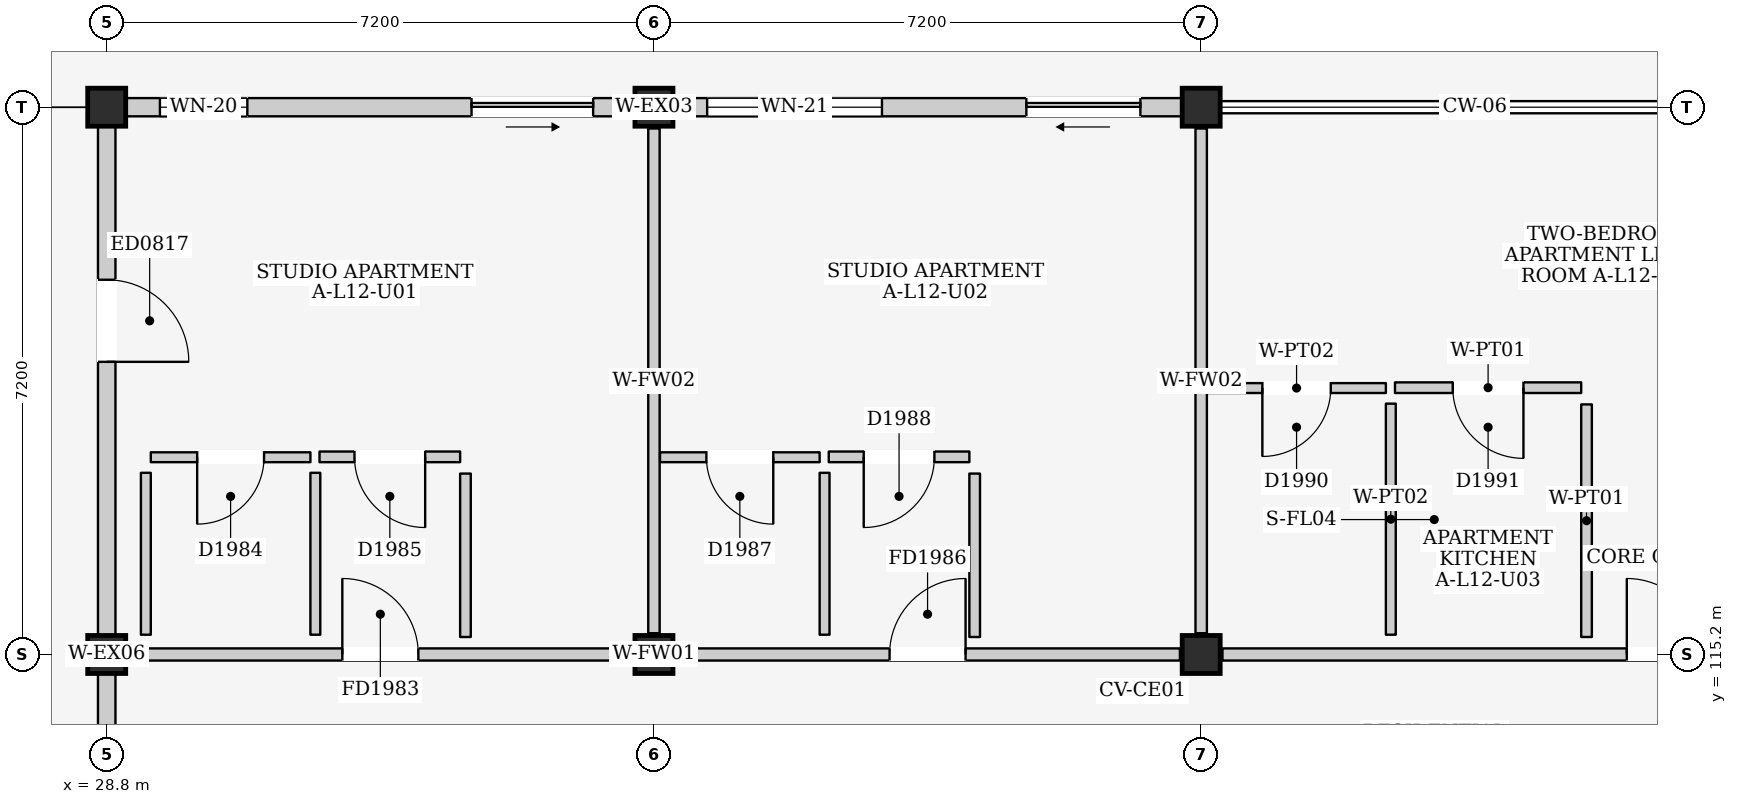
"""IFC4 building model, lengths in metres.
Left out: names, types, materials, properties, quantities, classifications, styles, units other than length and angle.
Written with IfcOpenShell. Run it as: python <this file> out.ifc"""

import sys

from ifc_helpers import new_model, si_unit, direction, frame, frame_2d, origin, origin_2d, place, context, subcontext, project, spatial, rectangle, extrude, element, fill, save


model = new_model("IFC4")
c1 = context("Model", 3, precision=1e-05, world=origin(), true_north=direction((0.0, 1.0)))
c2 = subcontext(c1, "Body", "Model", "MODEL_VIEW")
j1 = project(units=[si_unit("LENGTHUNIT", "METRE"), si_unit("PLANEANGLEUNIT", "RADIAN")], contexts=[c1])
p1 = place(None, origin())
s1 = spatial("IfcSite", under=j1, at=p1, CompositionType="ELEMENT")
p2 = place(p1, origin())
s2 = spatial("IfcBuilding", under=s1, at=p2, CompositionType="ELEMENT")
p3 = place(p2, frame((0.0, 0.0, 41.2)))
s3 = spatial("IfcBuildingStorey", under=s2, at=p3, CompositionType="ELEMENT", Elevation=41.2)
for number, where, z_axis, x_axis in (
    (1, (28.8, 115.2, 0.0), (0.0, 0.0, 1.0), (1.0, 0.0, 0.0)),
    (2, (28.8, 122.4, 0.0), (0.0, 0.0, 1.0), (1.0, 0.0, 0.0)),
    (3, (36.0, 115.2, 0.0), (0.0, 0.0, 1.0), (1.0, 0.0, 0.0)),
    (4, (36.0, 122.4, 0.0), (0.0, 0.0, 1.0), (1.0, 0.0, 0.0)),
    (5, (43.2, 115.2, 0.0), (0.0, 0.0, 1.0), (1.0, 0.0, 0.0)),
    (6, (43.2, 122.4, 0.0), (0.0, 0.0, 1.0), (1.0, 0.0, 0.0)),
):
    element("IfcColumn", number, at=place(p3, frame(where, z_axis=z_axis, x_axis=x_axis)), inside=s3, PredefinedType="COLUMN", context=c2, shape_type="SweptSolid", body=[
        extrude(rectangle(XDim=0.5, YDim=0.5, at=origin_2d()), origin(), (0.0, 0.0, 1.0), 3.2),
    ])
p4 = place(p3, frame((29.05, 122.4, 0.0), z_axis=(0.0, 0.0, 1.0), x_axis=(1.0, 0.0, 0.0)))
e7 = element("IfcWall", 7, at=p4, inside=s3, PredefinedType="ELEMENTEDWALL", context=c2, shape_type="SweptSolid", body=[
    extrude(rectangle(XDim=6.7, YDim=0.24, at=frame_2d((3.35, 0.0))), origin(), (0.0, 0.0, 1.0), 2.485),
])
p5 = place(p4, frame((4.55, 0.0, 0.0)))
e8 = element("IfcOpeningElement", 8, at=p5, cuts=e7, PredefinedType="OPENING", context=c2, shape_type="SweptSolid", body=[
    extrude(rectangle(XDim=1.6, YDim=2.12, at=frame_2d((0.8, 1.06))), frame((0.0, 0.135, 0.0), z_axis=(0.0, -1.0, 0.0), x_axis=(1.0, 0.0, 0.0)), (0.0, 0.0, 1.0), 0.27),
])
p6 = place(p4, frame((0.45, 0.0, 0.9)))
e9 = element("IfcOpeningElement", 9, at=p6, cuts=e7, PredefinedType="OPENING", context=c2, shape_type="SweptSolid", body=[
    extrude(rectangle(XDim=1.15, YDim=1.15, at=frame_2d((0.575, 0.575))), frame((0.0, 0.135, 0.0), z_axis=(0.0, -1.0, 0.0), x_axis=(1.0, 0.0, 0.0)), (0.0, 0.0, 1.0), 0.27),
])
p7 = place(p3, frame((36.25, 122.4, 0.0), z_axis=(0.0, 0.0, 1.0), x_axis=(1.0, 0.0, 0.0)))
e10 = element("IfcWall", 10, at=p7, inside=s3, PredefinedType="ELEMENTEDWALL", context=c2, shape_type="SweptSolid", body=[
    extrude(rectangle(XDim=6.7, YDim=0.24, at=frame_2d((3.35, 0.0))), origin(), (0.0, 0.0, 1.0), 2.485),
])
p8 = place(p7, frame((4.65, 0.0, 0.0)))
e11 = element("IfcOpeningElement", 11, at=p8, cuts=e10, PredefinedType="OPENING", context=c2, shape_type="SweptSolid", body=[
    extrude(rectangle(XDim=1.5, YDim=2.12, at=frame_2d((0.75, 1.06))), frame((0.0, 0.135, 0.0), z_axis=(0.0, -1.0, 0.0), x_axis=(1.0, 0.0, 0.0)), (0.0, 0.0, 1.0), 0.27),
])
p9 = place(p7, frame((0.45, 0.0, 0.775)))
e12 = element("IfcOpeningElement", 12, at=p9, cuts=e10, PredefinedType="OPENING", context=c2, shape_type="SweptSolid", body=[
    extrude(rectangle(XDim=2.3, YDim=1.6, at=frame_2d((1.15, 0.8))), frame((0.0, 0.135, 0.0), z_axis=(0.0, -1.0, 0.0), x_axis=(1.0, 0.0, 0.0)), (0.0, 0.0, 1.0), 0.27),
])
p10 = place(p3, frame((28.8, 108.25, 0.0), z_axis=(0.0, 0.0, 1.0), x_axis=(0.0, 1.0, 0.0)))
e13 = element("IfcWall", 13, at=p10, inside=s3, PredefinedType="ELEMENTEDWALL", context=c2, shape_type="SweptSolid", body=[
    extrude(rectangle(XDim=6.7, YDim=0.23, at=frame_2d((3.35, 0.0))), origin(), (0.0, 0.0, 1.0), 2.435),
])
p11 = place(p10, frame((2.75, 0.0, 1.1)))
e14 = element("IfcOpeningElement", 14, at=p11, cuts=e13, PredefinedType="OPENING", context=c2, shape_type="SweptSolid", body=[
    extrude(rectangle(XDim=1.0, YDim=0.9, at=frame_2d((0.5, 0.45))), frame((0.0, 0.13, 0.0), z_axis=(0.0, -1.0, 0.0), x_axis=(1.0, 0.0, 0.0)), (0.0, 0.0, 1.0), 0.26),
])
p12 = place(p3, frame((28.8, 115.45, 0.0), z_axis=(0.0, 0.0, 1.0), x_axis=(0.0, 1.0, 0.0)))
e15 = element("IfcWall", 15, at=p12, inside=s3, PredefinedType="ELEMENTEDWALL", context=c2, shape_type="SweptSolid", body=[
    extrude(rectangle(XDim=6.7, YDim=0.23, at=frame_2d((3.35, 0.0))), origin(), (0.0, 0.0, 1.0), 2.435),
])
p13 = place(p12, frame((3.6, 0.0, 0.0)))
e16 = element("IfcOpeningElement", 16, at=p13, cuts=e15, PredefinedType="OPENING", context=c2, shape_type="SweptSolid", body=[
    extrude(rectangle(XDim=1.08, YDim=2.12, at=frame_2d((0.54, 1.06))), frame((0.0, 0.13, 0.0), z_axis=(0.0, -1.0, 0.0), x_axis=(1.0, 0.0, 0.0)), (0.0, 0.0, 1.0), 0.26),
])
p14 = place(p3, frame((29.08, 115.2, 0.0), z_axis=(0.0, 0.0, 1.0), x_axis=(1.0, 0.0, 0.0)))
e17 = element("IfcWall", 17, at=p14, inside=s3, PredefinedType="PARTITIONING", context=c2, shape_type="SweptSolid", body=[
    extrude(rectangle(XDim=6.64, YDim=0.16, at=frame_2d((3.32, 0.0))), origin(), (0.0, 0.0, 1.0), 2.285),
])
p15 = place(p14, frame((2.82, 0.0, 0.0)))
e18 = element("IfcOpeningElement", 18, at=p15, cuts=e17, PredefinedType="OPENING", context=c2, shape_type="SweptSolid", body=[
    extrude(rectangle(XDim=1.0, YDim=2.15, at=frame_2d((0.5, 1.075))), frame((0.0, 0.095, 0.0), z_axis=(0.0, -1.0, 0.0), x_axis=(1.0, 0.0, 0.0)), (0.0, 0.0, 1.0), 0.19),
])
p16 = place(p3, frame((36.0, 115.48, 0.0), z_axis=(0.0, 0.0, 1.0), x_axis=(0.0, 1.0, 0.0)))
e19 = element("IfcWall", 19, at=p16, inside=s3, PredefinedType="PARTITIONING", context=c2, shape_type="SweptSolid", body=[
    extrude(rectangle(XDim=6.64, YDim=0.15, at=frame_2d((3.32, 0.0))), origin(), (0.0, 0.0, 1.0), 2.435),
])
p17 = place(p3, frame((29.38, 117.795, 0.0), z_axis=(0.0, 0.0, 1.0), x_axis=(1.0, 0.0, 0.0)))
e20 = element("IfcWall", 20, at=p17, inside=s3, PredefinedType="PARTITIONING", context=c2, shape_type="SweptSolid", body=[
    extrude(rectangle(XDim=2.1, YDim=0.13, at=frame_2d((1.05, 0.0))), origin(), (0.0, 0.0, 1.0), 2.95),
])
p18 = place(p17, frame((0.61, 0.0, 0.0)))
e21 = element("IfcOpeningElement", 21, at=p18, cuts=e20, PredefinedType="OPENING", context=c2, shape_type="SweptSolid", body=[
    extrude(rectangle(XDim=0.88, YDim=2.1, at=frame_2d((0.44, 1.05))), frame((0.0, 0.08, 0.0), z_axis=(0.0, -1.0, 0.0), x_axis=(1.0, 0.0, 0.0)), (0.0, 0.0, 1.0), 0.16),
])
for number, where, z_axis, x_axis in (
    (22, (31.545, 115.46, 0.0), (0.0, 0.0, 1.0), (0.0, 1.0, 0.0)),
    (23, (29.315, 115.46, 0.0), (0.0, 0.0, 1.0), (0.0, 1.0, 0.0)),
):
    element("IfcWall", number, at=place(p3, frame(where, z_axis=z_axis, x_axis=x_axis)), inside=s3, PredefinedType="PARTITIONING", context=c2, shape_type="SweptSolid", body=[
        extrude(rectangle(XDim=2.13, YDim=0.13, at=frame_2d((1.065, 0.0))), origin(), (0.0, 0.0, 1.0), 2.95),
    ])
p19 = place(p3, frame((31.6, 117.8, 0.0), z_axis=(0.0, 0.0, 1.0), x_axis=(1.0, 0.0, 0.0)))
e24 = element("IfcWall", 24, at=p19, inside=s3, PredefinedType="PARTITIONING", context=c2, shape_type="SweptSolid", body=[
    extrude(rectangle(XDim=1.85, YDim=0.14, at=frame_2d((0.925, 0.0))), origin(), (0.0, 0.0, 1.0), 2.95),
])
p20 = place(p19, frame((0.46, 0.0, 0.0)))
e25 = element("IfcOpeningElement", 25, at=p20, cuts=e24, PredefinedType="OPENING", context=c2, shape_type="SweptSolid", body=[
    extrude(rectangle(XDim=0.93, YDim=2.14, at=frame_2d((0.465, 1.07))), frame((0.0, 0.085, 0.0), z_axis=(0.0, -1.0, 0.0), x_axis=(1.0, 0.0, 0.0)), (0.0, 0.0, 1.0), 0.17),
])
p21 = place(p3, frame((33.52, 115.43, 0.0), z_axis=(0.0, 0.0, 1.0), x_axis=(0.0, 1.0, 0.0)))
e26 = element("IfcWall", 26, at=p21, inside=s3, PredefinedType="PARTITIONING", context=c2, shape_type="SweptSolid", body=[
    extrude(rectangle(XDim=2.15, YDim=0.14, at=frame_2d((1.075, 0.0))), origin(), (0.0, 0.0, 1.0), 2.95),
])
p22 = place(p3, frame((36.28, 115.2, 0.0), z_axis=(0.0, 0.0, 1.0), x_axis=(1.0, 0.0, 0.0)))
e27 = element("IfcWall", 27, at=p22, inside=s3, PredefinedType="PARTITIONING", context=c2, shape_type="SweptSolid", body=[
    extrude(rectangle(XDim=6.64, YDim=0.16, at=frame_2d((3.32, 0.0))), origin(), (0.0, 0.0, 1.0), 2.285),
])
p23 = place(p22, frame((2.82, 0.0, 0.0)))
e28 = element("IfcOpeningElement", 28, at=p23, cuts=e27, PredefinedType="OPENING", context=c2, shape_type="SweptSolid", body=[
    extrude(rectangle(XDim=1.0, YDim=2.15, at=frame_2d((0.5, 1.075))), frame((0.0, 0.095, 0.0), z_axis=(0.0, -1.0, 0.0), x_axis=(1.0, 0.0, 0.0)), (0.0, 0.0, 1.0), 0.19),
])
p24 = place(p3, frame((43.2, 115.48, 0.0), z_axis=(0.0, 0.0, 1.0), x_axis=(0.0, 1.0, 0.0)))
e29 = element("IfcWall", 29, at=p24, inside=s3, PredefinedType="PARTITIONING", context=c2, shape_type="SweptSolid", body=[
    extrude(rectangle(XDim=6.64, YDim=0.15, at=frame_2d((3.32, 0.0))), origin(), (0.0, 0.0, 1.0), 2.435),
])
p25 = place(p3, frame((36.08, 117.795, 0.0), z_axis=(0.0, 0.0, 1.0), x_axis=(1.0, 0.0, 0.0)))
e30 = element("IfcWall", 30, at=p25, inside=s3, PredefinedType="PARTITIONING", context=c2, shape_type="SweptSolid", body=[
    extrude(rectangle(XDim=2.1, YDim=0.13, at=frame_2d((1.05, 0.0))), origin(), (0.0, 0.0, 1.0), 2.95),
])
p26 = place(p25, frame((0.61, 0.0, 0.0)))
e31 = element("IfcOpeningElement", 31, at=p26, cuts=e30, PredefinedType="OPENING", context=c2, shape_type="SweptSolid", body=[
    extrude(rectangle(XDim=0.88, YDim=2.1, at=frame_2d((0.44, 1.05))), frame((0.0, 0.08, 0.0), z_axis=(0.0, -1.0, 0.0), x_axis=(1.0, 0.0, 0.0)), (0.0, 0.0, 1.0), 0.16),
])
p27 = place(p3, frame((38.245, 115.46, 0.0), z_axis=(0.0, 0.0, 1.0), x_axis=(0.0, 1.0, 0.0)))
e32 = element("IfcWall", 32, at=p27, inside=s3, PredefinedType="PARTITIONING", context=c2, shape_type="SweptSolid", body=[
    extrude(rectangle(XDim=2.13, YDim=0.13, at=frame_2d((1.065, 0.0))), origin(), (0.0, 0.0, 1.0), 2.95),
])
p28 = place(p3, frame((38.3, 117.8, 0.0), z_axis=(0.0, 0.0, 1.0), x_axis=(1.0, 0.0, 0.0)))
e33 = element("IfcWall", 33, at=p28, inside=s3, PredefinedType="PARTITIONING", context=c2, shape_type="SweptSolid", body=[
    extrude(rectangle(XDim=1.85, YDim=0.14, at=frame_2d((0.925, 0.0))), origin(), (0.0, 0.0, 1.0), 2.95),
])
p29 = place(p28, frame((0.46, 0.0, 0.0)))
e34 = element("IfcOpeningElement", 34, at=p29, cuts=e33, PredefinedType="OPENING", context=c2, shape_type="SweptSolid", body=[
    extrude(rectangle(XDim=0.93, YDim=2.14, at=frame_2d((0.465, 1.07))), frame((0.0, 0.085, 0.0), z_axis=(0.0, -1.0, 0.0), x_axis=(1.0, 0.0, 0.0)), (0.0, 0.0, 1.0), 0.17),
])
p30 = place(p3, frame((40.22, 115.43, 0.0), z_axis=(0.0, 0.0, 1.0), x_axis=(0.0, 1.0, 0.0)))
e35 = element("IfcWall", 35, at=p30, inside=s3, PredefinedType="PARTITIONING", context=c2, shape_type="SweptSolid", body=[
    extrude(rectangle(XDim=2.15, YDim=0.14, at=frame_2d((1.075, 0.0))), origin(), (0.0, 0.0, 1.0), 2.95),
])
p31 = place(p3, frame((43.48, 115.2, 0.0), z_axis=(0.0, 0.0, 1.0), x_axis=(1.0, 0.0, 0.0)))
e36 = element("IfcWall", 36, at=p31, inside=s3, PredefinedType="PARTITIONING", context=c2, shape_type="SweptSolid", body=[
    extrude(rectangle(XDim=6.64, YDim=0.16, at=frame_2d((3.32, 0.0))), origin(), (0.0, 0.0, 1.0), 2.285),
])
p32 = place(p31, frame((5.32, 0.0, 0.0)))
e37 = element("IfcOpeningElement", 37, at=p32, cuts=e36, PredefinedType="OPENING", context=c2, shape_type="SweptSolid", body=[
    extrude(rectangle(XDim=1.0, YDim=2.15, at=frame_2d((0.5, 1.075))), frame((0.0, 0.095, 0.0), z_axis=(0.0, -1.0, 0.0), x_axis=(1.0, 0.0, 0.0)), (0.0, 0.0, 1.0), 0.19),
])
p33 = place(p3, frame((43.28, 118.705, 0.0), z_axis=(0.0, 0.0, 1.0), x_axis=(1.0, 0.0, 0.0)))
e38 = element("IfcWall", 38, at=p33, inside=s3, PredefinedType="PARTITIONING", context=c2, shape_type="SweptSolid", body=[
    extrude(rectangle(XDim=2.35, YDim=0.13, at=frame_2d((1.175, 0.0))), origin(), (0.0, 0.0, 1.0), 2.95),
])
p34 = place(p33, frame((0.725, 0.0, 0.0)))
e39 = element("IfcOpeningElement", 39, at=p34, cuts=e38, PredefinedType="OPENING", context=c2, shape_type="SweptSolid", body=[
    extrude(rectangle(XDim=0.9, YDim=2.1, at=frame_2d((0.45, 1.05))), frame((0.0, 0.08, 0.0), z_axis=(0.0, -1.0, 0.0), x_axis=(1.0, 0.0, 0.0)), (0.0, 0.0, 1.0), 0.16),
])
p35 = place(p3, frame((45.695, 115.46, 0.0), z_axis=(0.0, 0.0, 1.0), x_axis=(0.0, 1.0, 0.0)))
e40 = element("IfcWall", 40, at=p35, inside=s3, PredefinedType="PARTITIONING", context=c2, shape_type="SweptSolid", body=[
    extrude(rectangle(XDim=3.04, YDim=0.13, at=frame_2d((1.52, 0.0))), origin(), (0.0, 0.0, 1.0), 2.95),
])
p36 = place(p3, frame((45.75, 118.71, 0.0), z_axis=(0.0, 0.0, 1.0), x_axis=(1.0, 0.0, 0.0)))
e41 = element("IfcWall", 41, at=p36, inside=s3, PredefinedType="PARTITIONING", context=c2, shape_type="SweptSolid", body=[
    extrude(rectangle(XDim=2.45, YDim=0.14, at=frame_2d((1.225, 0.0))), origin(), (0.0, 0.0, 1.0), 2.95),
])
p37 = place(p36, frame((0.76, 0.0, 0.0)))
e42 = element("IfcOpeningElement", 42, at=p37, cuts=e41, PredefinedType="OPENING", context=c2, shape_type="SweptSolid", body=[
    extrude(rectangle(XDim=0.93, YDim=2.14, at=frame_2d((0.465, 1.07))), frame((0.0, 0.085, 0.0), z_axis=(0.0, -1.0, 0.0), x_axis=(1.0, 0.0, 0.0)), (0.0, 0.0, 1.0), 0.17),
])
p38 = place(p3, frame((48.27, 115.43, 0.0), z_axis=(0.0, 0.0, 1.0), x_axis=(0.0, 1.0, 0.0)))
e43 = element("IfcWall", 43, at=p38, inside=s3, PredefinedType="PARTITIONING", context=c2, shape_type="SweptSolid", body=[
    extrude(rectangle(XDim=3.06, YDim=0.14, at=frame_2d((1.53, 0.0))), origin(), (0.0, 0.0, 1.0), 2.95),
])
p39 = place(p5, frame((1.6, 0.0, 0.0), z_axis=(0.0, 0.0, 1.0), x_axis=(-1.0, 0.0, 0.0)))
e44 = element("IfcDoor", 44, at=p39, inside=s3, OperationType="SLIDING_TO_RIGHT", PredefinedType="DOOR", context=c2, shape_type="SweptSolid", body=[
    extrude(rectangle(XDim=1.6, YDim=2.12, at=frame_2d((0.8, 1.06))), frame((0.0, 0.025, 0.0), z_axis=(0.0, -1.0, 0.0), x_axis=(1.0, 0.0, 0.0)), (0.0, 0.0, 1.0), 0.05),
])
fill(e8, e44)
p40 = place(p6, origin())
e45 = element("IfcWindow", 45, at=p40, inside=s3, PartitioningType="SINGLE_PANEL", PredefinedType="WINDOW", context=c2, shape_type="SweptSolid", body=[
    extrude(rectangle(XDim=1.15, YDim=1.15, at=frame_2d((0.575, 0.575))), frame((0.0, 0.03, 0.0), z_axis=(0.0, -1.0, 0.0), x_axis=(1.0, 0.0, 0.0)), (0.0, 0.0, 1.0), 0.06),
])
fill(e9, e45)
p41 = place(p8, frame((1.5, 0.0, 0.0), z_axis=(0.0, 0.0, 1.0), x_axis=(-1.0, 0.0, 0.0)))
e46 = element("IfcDoor", 46, at=p41, inside=s3, OperationType="SLIDING_TO_LEFT", PredefinedType="DOOR", context=c2, shape_type="SweptSolid", body=[
    extrude(rectangle(XDim=1.5, YDim=2.12, at=frame_2d((0.75, 1.06))), frame((0.0, 0.025, 0.0), z_axis=(0.0, -1.0, 0.0), x_axis=(1.0, 0.0, 0.0)), (0.0, 0.0, 1.0), 0.05),
])
fill(e11, e46)
p42 = place(p9, origin())
e47 = element("IfcWindow", 47, at=p42, inside=s3, PartitioningType="TRIPLE_PANEL_VERTICAL", PredefinedType="WINDOW", context=c2, shape_type="SweptSolid", body=[
    extrude(rectangle(XDim=2.3, YDim=1.6, at=frame_2d((1.15, 0.8))), frame((0.0, 0.03, 0.0), z_axis=(0.0, -1.0, 0.0), x_axis=(1.0, 0.0, 0.0)), (0.0, 0.0, 1.0), 0.06),
])
fill(e12, e47)
p43 = place(p13, frame((1.08, 0.0, 0.0), z_axis=(0.0, 0.0, 1.0), x_axis=(-1.0, 0.0, 0.0)))
e48 = element("IfcDoor", 48, at=p43, inside=s3, OperationType="SINGLE_SWING_RIGHT", PredefinedType="DOOR", context=c2, shape_type="SweptSolid", body=[
    extrude(rectangle(XDim=1.08, YDim=2.12, at=frame_2d((0.54, 1.06))), frame((0.0, 0.025, 0.0), z_axis=(0.0, -1.0, 0.0), x_axis=(1.0, 0.0, 0.0)), (0.0, 0.0, 1.0), 0.05),
])
fill(e16, e48)
p44 = place(p15, origin())
e49 = element("IfcDoor", 49, at=p44, inside=s3, OperationType="SINGLE_SWING_LEFT", PredefinedType="DOOR", context=c2, shape_type="SweptSolid", body=[
    extrude(rectangle(XDim=1.0, YDim=2.15, at=frame_2d((0.5, 1.075))), frame((0.0, 0.025, 0.0), z_axis=(0.0, -1.0, 0.0), x_axis=(1.0, 0.0, 0.0)), (0.0, 0.0, 1.0), 0.05),
])
fill(e18, e49)
p45 = place(p18, frame((0.88, 0.0, 0.0), z_axis=(0.0, 0.0, 1.0), x_axis=(-1.0, 0.0, 0.0)))
e50 = element("IfcDoor", 50, at=p45, inside=s3, OperationType="SINGLE_SWING_RIGHT", PredefinedType="DOOR", context=c2, shape_type="SweptSolid", body=[
    extrude(rectangle(XDim=0.88, YDim=2.1, at=frame_2d((0.44, 1.05))), frame((0.0, 0.025, 0.0), z_axis=(0.0, -1.0, 0.0), x_axis=(1.0, 0.0, 0.0)), (0.0, 0.0, 1.0), 0.05),
])
fill(e21, e50)
p46 = place(p20, frame((0.93, 0.0, 0.0), z_axis=(0.0, 0.0, 1.0), x_axis=(-1.0, 0.0, 0.0)))
e51 = element("IfcDoor", 51, at=p46, inside=s3, OperationType="SINGLE_SWING_LEFT", PredefinedType="DOOR", context=c2, shape_type="SweptSolid", body=[
    extrude(rectangle(XDim=0.93, YDim=2.14, at=frame_2d((0.465, 1.07))), frame((0.0, 0.025, 0.0), z_axis=(0.0, -1.0, 0.0), x_axis=(1.0, 0.0, 0.0)), (0.0, 0.0, 1.0), 0.05),
])
fill(e25, e51)
p47 = place(p23, origin())
e52 = element("IfcDoor", 52, at=p47, inside=s3, OperationType="SINGLE_SWING_RIGHT", PredefinedType="DOOR", context=c2, shape_type="SweptSolid", body=[
    extrude(rectangle(XDim=1.0, YDim=2.15, at=frame_2d((0.5, 1.075))), frame((0.0, 0.025, 0.0), z_axis=(0.0, -1.0, 0.0), x_axis=(1.0, 0.0, 0.0)), (0.0, 0.0, 1.0), 0.05),
])
fill(e28, e52)
p48 = place(p26, frame((0.88, 0.0, 0.0), z_axis=(0.0, 0.0, 1.0), x_axis=(-1.0, 0.0, 0.0)))
e53 = element("IfcDoor", 53, at=p48, inside=s3, OperationType="SINGLE_SWING_LEFT", PredefinedType="DOOR", context=c2, shape_type="SweptSolid", body=[
    extrude(rectangle(XDim=0.88, YDim=2.1, at=frame_2d((0.44, 1.05))), frame((0.0, 0.025, 0.0), z_axis=(0.0, -1.0, 0.0), x_axis=(1.0, 0.0, 0.0)), (0.0, 0.0, 1.0), 0.05),
])
fill(e31, e53)
p49 = place(p29, frame((0.93, 0.0, 0.0), z_axis=(0.0, 0.0, 1.0), x_axis=(-1.0, 0.0, 0.0)))
e54 = element("IfcDoor", 54, at=p49, inside=s3, OperationType="SINGLE_SWING_RIGHT", PredefinedType="DOOR", context=c2, shape_type="SweptSolid", body=[
    extrude(rectangle(XDim=0.93, YDim=2.14, at=frame_2d((0.465, 1.07))), frame((0.0, 0.025, 0.0), z_axis=(0.0, -1.0, 0.0), x_axis=(1.0, 0.0, 0.0)), (0.0, 0.0, 1.0), 0.05),
])
fill(e34, e54)
p50 = place(p32, origin())
e55 = element("IfcDoor", 55, at=p50, inside=s3, OperationType="SINGLE_SWING_LEFT", PredefinedType="DOOR", context=c2, shape_type="SweptSolid", body=[
    extrude(rectangle(XDim=1.0, YDim=2.15, at=frame_2d((0.5, 1.075))), frame((0.0, 0.025, 0.0), z_axis=(0.0, -1.0, 0.0), x_axis=(1.0, 0.0, 0.0)), (0.0, 0.0, 1.0), 0.05),
])
fill(e37, e55)
p51 = place(p34, frame((0.9, 0.0, 0.0), z_axis=(0.0, 0.0, 1.0), x_axis=(-1.0, 0.0, 0.0)))
e56 = element("IfcDoor", 56, at=p51, inside=s3, OperationType="SINGLE_SWING_RIGHT", PredefinedType="DOOR", context=c2, shape_type="SweptSolid", body=[
    extrude(rectangle(XDim=0.9, YDim=2.1, at=frame_2d((0.45, 1.05))), frame((0.0, 0.025, 0.0), z_axis=(0.0, -1.0, 0.0), x_axis=(1.0, 0.0, 0.0)), (0.0, 0.0, 1.0), 0.05),
])
fill(e39, e56)
p52 = place(p37, frame((0.93, 0.0, 0.0), z_axis=(0.0, 0.0, 1.0), x_axis=(-1.0, 0.0, 0.0)))
e57 = element("IfcDoor", 57, at=p52, inside=s3, OperationType="SINGLE_SWING_LEFT", PredefinedType="DOOR", context=c2, shape_type="SweptSolid", body=[
    extrude(rectangle(XDim=0.93, YDim=2.14, at=frame_2d((0.465, 1.07))), frame((0.0, 0.025, 0.0), z_axis=(0.0, -1.0, 0.0), x_axis=(1.0, 0.0, 0.0)), (0.0, 0.0, 1.0), 0.05),
])
fill(e42, e57)
save(model, sys.argv[1])
